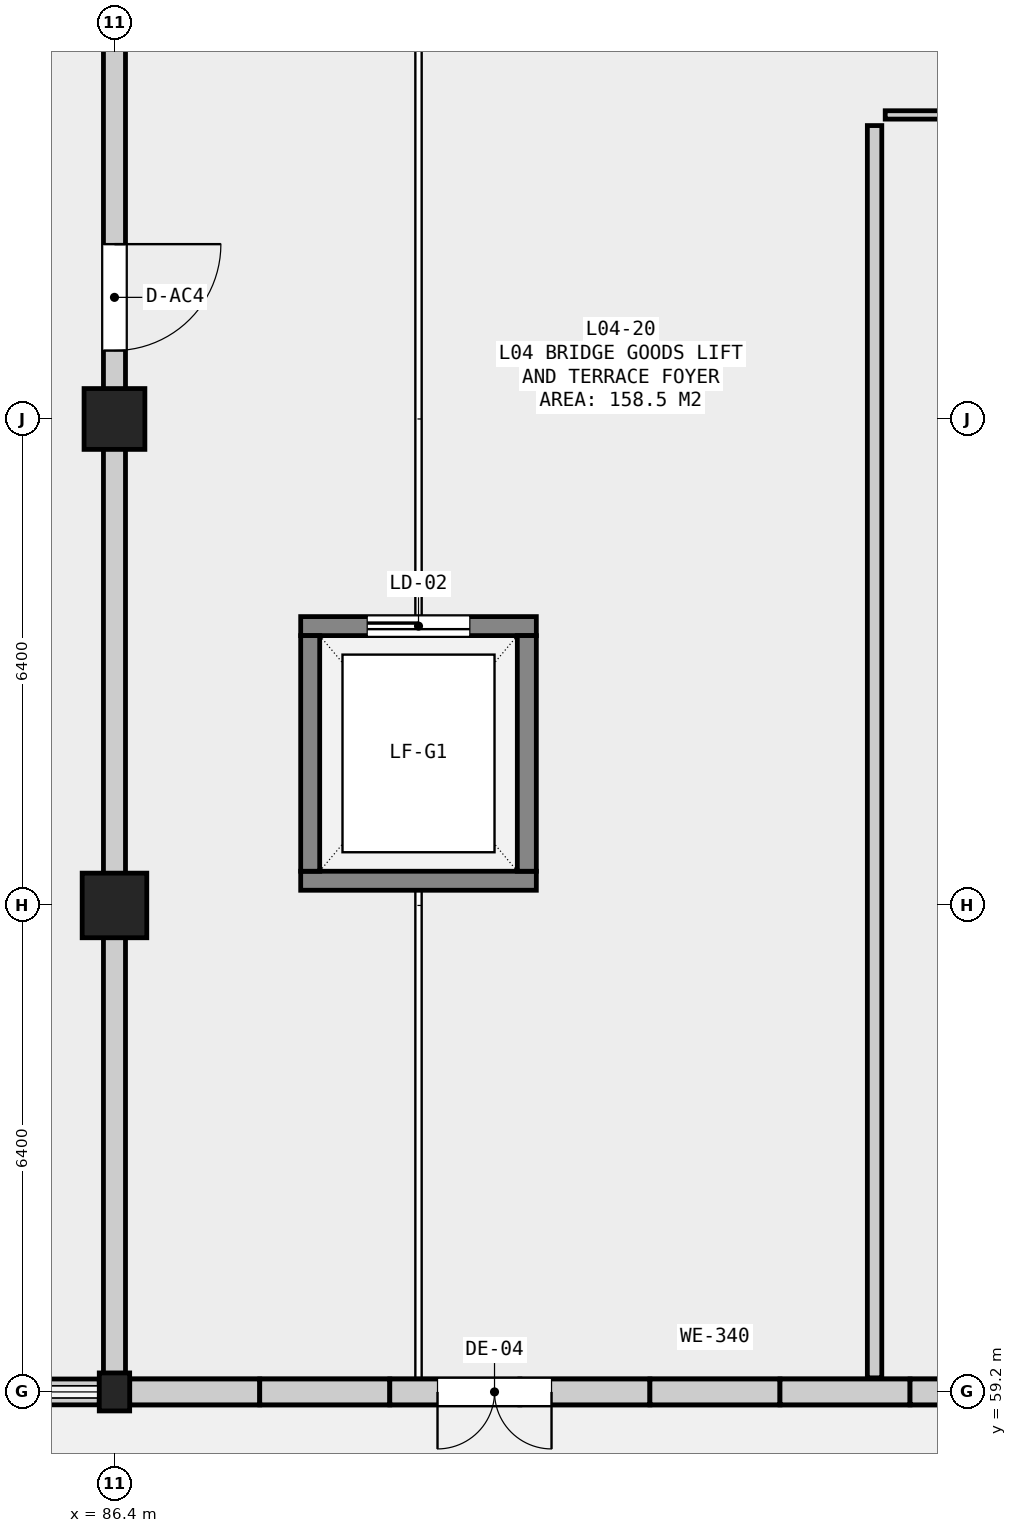
"""IFC4 building model, lengths in metres.
Left out: names, types, materials, properties, quantities, classifications, styles, units other than length and angle.
Written with IfcOpenShell. Run it as: python <this file> out.ifc"""

import sys

from ifc_helpers import new_model, si_unit, direction, frame, frame_2d, origin, origin_2d, place, context, subcontext, project, spatial, rectangle, extrude, element, fill, save


model = new_model("IFC4")
c1 = context("Model", 3, precision=1e-05, world=origin(), true_north=direction((0.0, 1.0)))
c2 = subcontext(c1, "Body", "Model", "MODEL_VIEW")
j1 = project(units=[si_unit("LENGTHUNIT", "METRE"), si_unit("PLANEANGLEUNIT", "RADIAN")], contexts=[c1])
p1 = place(None, origin())
s1 = spatial("IfcSite", under=j1, at=p1, CompositionType="ELEMENT")
p2 = place(p1, origin())
s2 = spatial("IfcBuilding", under=s1, at=p2, CompositionType="ELEMENT")
p3 = place(p2, frame((0.0, 0.0, 19.8)))
s3 = spatial("IfcBuildingStorey", under=s2, at=p3, CompositionType="ELEMENT", Elevation=19.8)
p4 = place(p3, frame((86.4, 59.2, 0.0), z_axis=(0.0, 0.0, 1.0), x_axis=(1.0, 0.0, 0.0)))
e1 = element("IfcColumn", 1, at=p4, inside=s3, PredefinedType="COLUMN", context=c2, shape_type="SweptSolid", body=[
    extrude(rectangle(XDim=0.4, YDim=0.5, at=origin_2d()), origin(), (0.0, 0.0, 1.0), 4.0),
])
p5 = place(p3, frame((86.4, 65.6, 0.0), z_axis=(0.0, 0.0, 1.0), x_axis=(1.0, 0.0, 0.0)))
e2 = element("IfcColumn", 2, at=p5, inside=s3, PredefinedType="COLUMN", context=c2, shape_type="SweptSolid", body=[
    extrude(rectangle(XDim=0.85, YDim=0.85, at=origin_2d()), origin(), (0.0, 0.0, 1.0), 4.0),
])
p6 = place(p3, frame((86.4, 72.0, 0.0), z_axis=(0.0, 0.0, 1.0), x_axis=(1.0, 0.0, 0.0)))
e3 = element("IfcColumn", 3, at=p6, inside=s3, PredefinedType="COLUMN", context=c2, shape_type="SweptSolid", body=[
    extrude(rectangle(XDim=0.8, YDim=0.8, at=origin_2d()), origin(), (0.0, 0.0, 1.0), 4.0),
])
p7 = place(p3, frame((86.6, 59.2, 0.0), z_axis=(0.0, 0.0, 1.0), x_axis=(1.0, 0.0, 0.0)))
e4 = element("IfcWall", 4, at=p7, inside=s3, PredefinedType="SOLIDWALL", context=c2, shape_type="SweptSolid", body=[
    extrude(rectangle(XDim=15.4, YDim=0.34, at=frame_2d((7.7, 0.0))), origin(), (0.0, 0.0, 1.0), 2.89),
])
p8 = place(p7, frame((4.05, 0.0, 0.0)))
e5 = element("IfcOpeningElement", 5, at=p8, cuts=e4, PredefinedType="OPENING", context=c2, shape_type="SweptSolid", body=[
    extrude(rectangle(XDim=1.5, YDim=2.2, at=frame_2d((0.75, 1.1))), frame((0.0, 0.182, 0.0), z_axis=(0.0, -1.0, 0.0), x_axis=(1.0, 0.0, 0.0)), (0.0, 0.0, 1.0), 0.364),
])
p9 = place(p3, frame((85.114, 59.2, 4.0), z_axis=(0.0, 0.0, 1.0), x_axis=(1.0, 0.0, 0.0)))
e6 = element("IfcWall", 6, at=p9, inside=s3, PredefinedType="SOLIDWALL", context=c2, shape_type="SweptSolid", body=[
    extrude(rectangle(XDim=1.086, YDim=0.34, at=frame_2d((0.543, 0.0))), origin(), (0.0, 0.0, 1.0), 1.674),
])
p10 = place(p3, frame((86.6, 59.2, 4.0), z_axis=(0.0, 0.0, 1.0), x_axis=(1.0, 0.0, 0.0)))
e7 = element("IfcWall", 7, at=p10, inside=s3, PredefinedType="SOLIDWALL", context=c2, shape_type="SweptSolid", body=[
    extrude(rectangle(XDim=1.711, YDim=0.34, at=frame_2d((0.855, 0.0))), origin(), (0.0, 0.0, 1.0), 2.044),
])
p11 = place(p3, frame((88.311, 59.2, 4.0), z_axis=(0.0, 0.0, 1.0), x_axis=(1.0, 0.0, 0.0)))
e8 = element("IfcWall", 8, at=p11, inside=s3, PredefinedType="SOLIDWALL", context=c2, shape_type="SweptSolid", body=[
    extrude(rectangle(XDim=1.711, YDim=0.34, at=frame_2d((0.855, 0.0))), origin(), (0.0, 0.0, 1.0), 2.471),
])
p12 = place(p3, frame((90.022, 59.2, 4.0), z_axis=(0.0, 0.0, 1.0), x_axis=(1.0, 0.0, 0.0)))
e9 = element("IfcWall", 9, at=p12, inside=s3, PredefinedType="SOLIDWALL", context=c2, shape_type="SweptSolid", body=[
    extrude(rectangle(XDim=1.711, YDim=0.34, at=frame_2d((0.855, 0.0))), origin(), (0.0, 0.0, 1.0), 2.659),
])
p13 = place(p3, frame((91.733, 59.2, 4.0), z_axis=(0.0, 0.0, 1.0), x_axis=(1.0, 0.0, 0.0)))
e10 = element("IfcWall", 10, at=p13, inside=s3, PredefinedType="SOLIDWALL", context=c2, shape_type="SweptSolid", body=[
    extrude(rectangle(XDim=1.711, YDim=0.34, at=frame_2d((0.855, 0.0))), origin(), (0.0, 0.0, 1.0), 2.233),
])
p14 = place(p3, frame((93.444, 59.2, 4.0), z_axis=(0.0, 0.0, 1.0), x_axis=(1.0, 0.0, 0.0)))
e11 = element("IfcWall", 11, at=p14, inside=s3, PredefinedType="SOLIDWALL", context=c2, shape_type="SweptSolid", body=[
    extrude(rectangle(XDim=1.711, YDim=0.34, at=frame_2d((0.855, 0.0))), origin(), (0.0, 0.0, 1.0), 1.806),
])
p15 = place(p3, frame((95.156, 59.2, 4.0), z_axis=(0.0, 0.0, 1.0), x_axis=(1.0, 0.0, 0.0)))
e12 = element("IfcWall", 12, at=p15, inside=s3, PredefinedType="SOLIDWALL", context=c2, shape_type="SweptSolid", body=[
    extrude(rectangle(XDim=1.711, YDim=0.34, at=frame_2d((0.855, 0.0))), origin(), (0.0, 0.0, 1.0), 1.38),
])
p16 = place(p3, frame((96.867, 59.2, 4.0), z_axis=(0.0, 0.0, 1.0), x_axis=(1.0, 0.0, 0.0)))
e13 = element("IfcWall", 13, at=p16, inside=s3, PredefinedType="SOLIDWALL", context=c2, shape_type="SweptSolid", body=[
    extrude(rectangle(XDim=1.711, YDim=0.34, at=frame_2d((0.855, 0.0))), origin(), (0.0, 0.0, 1.0), 0.953),
])
p17 = place(p3, frame((88.85, 65.925, 0.0), z_axis=(0.0, 0.0, 1.0), x_axis=(1.0, 0.0, 0.0)))
e14 = element("IfcWall", 14, at=p17, inside=s3, PredefinedType="SHEAR", context=c2, shape_type="SweptSolid", body=[
    extrude(rectangle(XDim=3.1, YDim=0.25, at=frame_2d((1.55, 0.0))), origin(), (0.0, 0.0, 1.0), 3.72),
])
p18 = place(p3, frame((88.85, 69.275, 0.0), z_axis=(0.0, 0.0, 1.0), x_axis=(1.0, 0.0, 0.0)))
e15 = element("IfcWall", 15, at=p18, inside=s3, PredefinedType="SHEAR", context=c2, shape_type="SweptSolid", body=[
    extrude(rectangle(XDim=3.1, YDim=0.25, at=frame_2d((1.55, 0.0))), origin(), (0.0, 0.0, 1.0), 3.72),
])
p19 = place(p18, frame((0.875, 0.0, 0.0)))
e16 = element("IfcOpeningElement", 16, at=p19, cuts=e15, PredefinedType="OPENING", context=c2, shape_type="SweptSolid", body=[
    extrude(rectangle(XDim=1.35, YDim=2.2, at=frame_2d((0.675, 1.1))), frame((0.0, 0.137, 0.0), z_axis=(0.0, -1.0, 0.0), x_axis=(1.0, 0.0, 0.0)), (0.0, 0.0, 1.0), 0.274),
])
for number, where, z_axis, x_axis in (
    (17, (88.975, 66.05, 0.0), (0.0, 0.0, 1.0), (0.0, 1.0, 0.0)),
    (18, (91.825, 66.05, 0.0), (0.0, 0.0, 1.0), (0.0, 1.0, 0.0)),
):
    element("IfcWall", number, at=place(p3, frame(where, z_axis=z_axis, x_axis=x_axis)), inside=s3, PredefinedType="SHEAR", context=c2, shape_type="SweptSolid", body=[
        extrude(rectangle(XDim=3.1, YDim=0.25, at=frame_2d((1.55, 0.0))), origin(), (0.0, 0.0, 1.0), 3.72),
    ])
p20 = place(p3, frame((86.4, 59.385, 0.0), z_axis=(0.0, 0.0, 1.0), x_axis=(0.0, 1.0, 0.0)))
e19 = element("IfcWall", 19, at=p20, inside=s3, PredefinedType="SOLIDWALL", context=c2, shape_type="SweptSolid", body=[
    extrude(rectangle(XDim=27.675, YDim=0.29, at=frame_2d((13.837, 0.0))), origin(), (0.0, 0.0, 1.0), 3.72),
])
p21 = place(p20, frame((13.515, 0.0, 0.0)))
e20 = element("IfcOpeningElement", 20, at=p21, cuts=e19, PredefinedType="OPENING", context=c2, shape_type="SweptSolid", body=[
    extrude(rectangle(XDim=1.4, YDim=2.2, at=frame_2d((0.7, 1.1))), frame((0.0, 0.157, 0.0), z_axis=(0.0, -1.0, 0.0), x_axis=(1.0, 0.0, 0.0)), (0.0, 0.0, 1.0), 0.314),
])
p22 = place(p3, frame((96.54, 76.0, 0.0), z_axis=(0.0, 0.0, 1.0), x_axis=(1.0, 0.0, 0.0)))
e21 = element("IfcWall", 21, at=p22, inside=s3, PredefinedType="PARTITIONING", context=c2, shape_type="SweptSolid", body=[
    extrude(rectangle(XDim=24.12, YDim=0.11, at=frame_2d((12.06, 0.0))), origin(), (0.0, 0.0, 1.0), 3.72),
])
p23 = place(p22, frame((9.335, 0.0, 0.0)))
e22 = element("IfcOpeningElement", 22, at=p23, cuts=e21, PredefinedType="OPENING", context=c2, shape_type="SweptSolid", body=[
    extrude(rectangle(XDim=1.05, YDim=2.15, at=frame_2d((0.525, 1.075))), frame((0.0, 0.067, 0.0), z_axis=(0.0, -1.0, 0.0), x_axis=(1.0, 0.0, 0.0)), (0.0, 0.0, 1.0), 0.134),
])
p24 = place(p3, frame((96.4, 59.385, 0.0), z_axis=(0.0, 0.0, 1.0), x_axis=(0.0, 1.0, 0.0)))
e23 = element("IfcWall", 23, at=p24, inside=s3, PredefinedType="PARTITIONING", context=c2, shape_type="SweptSolid", body=[
    extrude(rectangle(XDim=16.475, YDim=0.19, at=frame_2d((8.238, 0.0))), origin(), (0.0, 0.0, 1.0), 3.72),
])
p25 = place(p8, frame((1.5, 0.0, 0.0), z_axis=(0.0, 0.0, 1.0), x_axis=(-1.0, 0.0, 0.0)))
e24 = element("IfcDoor", 24, at=p25, inside=s3, OperationType="DOUBLE_DOOR_SINGLE_SWING", PredefinedType="DOOR", context=c2, shape_type="SweptSolid", body=[
    extrude(rectangle(XDim=1.5, YDim=2.2, at=frame_2d((0.75, 1.1))), frame((0.0, 0.025, 0.0), z_axis=(0.0, -1.0, 0.0), x_axis=(1.0, 0.0, 0.0)), (0.0, 0.0, 1.0), 0.05),
])
fill(e5, e24)
p26 = place(p19, origin())
e25 = element("IfcDoor", 25, at=p26, inside=s3, OperationType="SLIDING_TO_LEFT", PredefinedType="DOOR", context=c2, shape_type="SweptSolid", body=[
    extrude(rectangle(XDim=1.35, YDim=2.2, at=frame_2d((0.675, 1.1))), frame((0.0, 0.025, 0.0), z_axis=(0.0, -1.0, 0.0), x_axis=(1.0, 0.0, 0.0)), (0.0, 0.0, 1.0), 0.05),
])
fill(e16, e25)
p27 = place(p21, frame((1.4, 0.0, 0.0), z_axis=(0.0, 0.0, 1.0), x_axis=(-1.0, 0.0, 0.0)))
e26 = element("IfcDoor", 26, at=p27, inside=s3, OperationType="SINGLE_SWING_LEFT", PredefinedType="DOOR", context=c2, shape_type="SweptSolid", body=[
    extrude(rectangle(XDim=1.4, YDim=2.2, at=frame_2d((0.7, 1.1))), frame((0.0, 0.025, 0.0), z_axis=(0.0, -1.0, 0.0), x_axis=(1.0, 0.0, 0.0)), (0.0, 0.0, 1.0), 0.05),
])
fill(e20, e26)
save(model, sys.argv[1])
